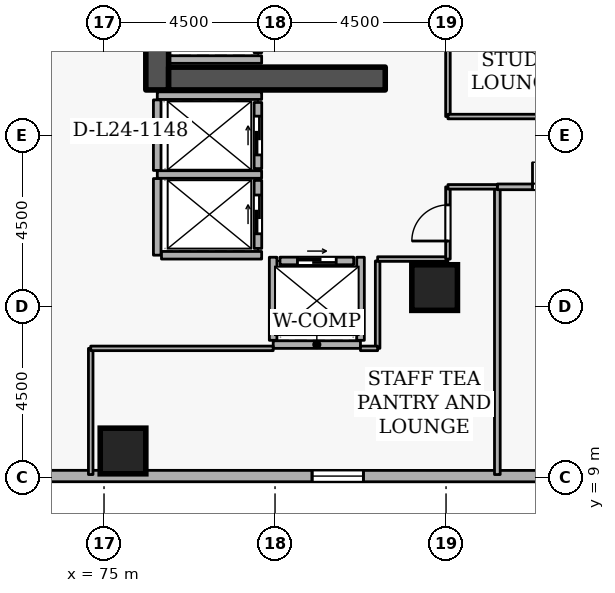
"""IFC4 building model, lengths in metres.
Left out: names, types, materials, properties, quantities, classifications, styles, units other than length and angle.
Written with IfcOpenShell. Run it as: python <this file> out.ifc"""

import sys

from ifc_helpers import new_model, si_unit, direction, frame, frame_2d, origin, origin_2d, place, context, subcontext, project, spatial, rectangle, extrude, element, fill, save


model = new_model("IFC4")
c1 = context("Model", 3, precision=1e-05, world=origin(), true_north=direction((0.0, 1.0)))
c2 = subcontext(c1, "Body", "Model", "MODEL_VIEW")
j1 = project(units=[si_unit("LENGTHUNIT", "METRE"), si_unit("PLANEANGLEUNIT", "RADIAN")], contexts=[c1])
p1 = place(None, origin())
s1 = spatial("IfcSite", under=j1, at=p1, CompositionType="ELEMENT")
p2 = place(p1, origin())
s2 = spatial("IfcBuilding", under=s1, at=p2, CompositionType="ELEMENT")
p3 = place(p2, frame((0.0, 0.0, 94.5)))
s3 = spatial("IfcBuildingStorey", under=s2, at=p3, CompositionType="ELEMENT", Elevation=94.5)
p4 = place(p3, frame((76.4, 19.2, 0.0), z_axis=(0.0, 0.0, 1.0), x_axis=(0.0, 1.0, 0.0)))
e1 = element("IfcWall", 1, at=p4, inside=s3, PredefinedType="SHEAR", context=c2, shape_type="SweptSolid", body=[
    extrude(rectangle(XDim=15.6, YDim=0.6, at=frame_2d((7.8, 0.0))), origin(), (0.0, 0.0, 1.0), 3.6),
])
p5 = place(p3, frame((76.7, 19.5, 0.0), z_axis=(0.0, 0.0, 1.0), x_axis=(1.0, 0.0, 0.0)))
e2 = element("IfcWall", 2, at=p5, inside=s3, PredefinedType="SHEAR", context=c2, shape_type="SweptSolid", body=[
    extrude(rectangle(XDim=5.7, YDim=0.6, at=frame_2d((2.85, 0.0))), origin(), (0.0, 0.0, 1.0), 3.6),
])
for number, where, z_axis, x_axis in (
    (3, (75.5, 9.7, 0.0), (0.0, 0.0, 1.0), (1.0, 0.0, 0.0)),
    (4, (83.7, 14.0, 0.0), (0.0, 0.0, 1.0), (1.0, 0.0, 0.0)),
):
    element("IfcColumn", number, at=place(p3, frame(where, z_axis=z_axis, x_axis=x_axis)), inside=s3, PredefinedType="COLUMN", context=c2, shape_type="SweptSolid", body=[
        extrude(rectangle(XDim=1.2, YDim=1.2, at=origin_2d()), origin(), (0.0, 0.0, 1.0), 3.6),
    ])
p6 = place(p3, frame((69.075, 9.042, 0.0), z_axis=(0.0, 0.0, 1.0), x_axis=(0.999999983371, -0.000182370391, 0.0)))
e5 = element("IfcWall", 5, at=p6, inside=s3, PredefinedType="STANDARD", context=c2, shape_type="SweptSolid", body=[
    extrude(rectangle(XDim=34.806, YDim=0.3, at=frame_2d((17.403, 0.0))), origin(), (0.0, 0.0, 1.0), 2.22),
])
p7 = place(p6, frame((1.8, 0.0, 0.72)))
e6 = element("IfcOpeningElement", 6, at=p7, cuts=e5, PredefinedType="OPENING", context=c2, shape_type="SweptSolid", body=[
    extrude(rectangle(XDim=1.35, YDim=1.05, at=frame_2d((0.675, 0.525))), frame((0.0, 0.16, 0.0), z_axis=(0.0, -1.0, 0.0), x_axis=(1.0, 0.0, 0.0)), (0.0, 0.0, 1.0), 0.32),
])
p8 = place(p6, frame((11.4, 0.0, 0.72)))
e7 = element("IfcOpeningElement", 7, at=p8, cuts=e5, PredefinedType="OPENING", context=c2, shape_type="SweptSolid", body=[
    extrude(rectangle(XDim=1.35, YDim=1.05, at=frame_2d((0.675, 0.525))), frame((0.0, 0.16, 0.0), z_axis=(0.0, -1.0, 0.0), x_axis=(1.0, 0.0, 0.0)), (0.0, 0.0, 1.0), 0.32),
])
p9 = place(p6, frame((21.0, 0.0, 0.72)))
e8 = element("IfcOpeningElement", 8, at=p9, cuts=e5, PredefinedType="OPENING", context=c2, shape_type="SweptSolid", body=[
    extrude(rectangle(XDim=1.35, YDim=1.05, at=frame_2d((0.675, 0.525))), frame((0.0, 0.16, 0.0), z_axis=(0.0, -1.0, 0.0), x_axis=(1.0, 0.0, 0.0)), (0.0, 0.0, 1.0), 0.32),
])
p10 = place(p6, frame((25.8, 0.0, 0.72)))
e9 = element("IfcOpeningElement", 9, at=p10, cuts=e5, PredefinedType="OPENING", context=c2, shape_type="SweptSolid", body=[
    extrude(rectangle(XDim=1.35, YDim=1.05, at=frame_2d((0.675, 0.525))), frame((0.0, 0.16, 0.0), z_axis=(0.0, -1.0, 0.0), x_axis=(1.0, 0.0, 0.0)), (0.0, 0.0, 1.0), 0.32),
])
p11 = place(p3, frame((79.05, 20.18, 0.0), z_axis=(0.0, 0.0, 1.0), x_axis=(0.0, 1.0, 0.0)))
e10 = element("IfcWall", 10, at=p11, inside=s3, PredefinedType="STANDARD", context=c2, shape_type="SweptSolid", body=[
    extrude(rectangle(XDim=1.94, YDim=0.2, at=frame_2d((0.97, 0.0))), origin(), (0.0, 0.0, 1.0), 3.3),
])
p12 = place(p3, frame((79.05, 17.13, 0.0), z_axis=(0.0, 0.0, 1.0), x_axis=(0.0, 1.0, 0.0)))
e11 = element("IfcWall", 11, at=p12, inside=s3, PredefinedType="STANDARD", context=c2, shape_type="SweptSolid", body=[
    extrude(rectangle(XDim=1.74, YDim=0.2, at=frame_2d((0.87, 0.0))), origin(), (0.0, 0.0, 1.0), 3.3),
])
p13 = place(p12, frame((0.36, 0.0, 0.0)))
e12 = element("IfcOpeningElement", 12, at=p13, cuts=e11, PredefinedType="OPENING", context=c2, shape_type="SweptSolid", body=[
    extrude(rectangle(XDim=1.02, YDim=2.06, at=frame_2d((0.51, 1.03))), frame((0.0, 0.11, 0.0), z_axis=(0.0, -1.0, 0.0), x_axis=(1.0, 0.0, 0.0)), (0.0, 0.0, 1.0), 0.22),
])
p14 = place(p3, frame((79.05, 15.03, 0.0), z_axis=(0.0, 0.0, 1.0), x_axis=(0.0, 1.0, 0.0)))
e13 = element("IfcWall", 13, at=p14, inside=s3, PredefinedType="STANDARD", context=c2, shape_type="SweptSolid", body=[
    extrude(rectangle(XDim=1.79, YDim=0.2, at=frame_2d((0.895, 0.0))), origin(), (0.0, 0.0, 1.0), 3.3),
])
p15 = place(p14, frame((0.385, 0.0, 0.0)))
e14 = element("IfcOpeningElement", 14, at=p15, cuts=e13, PredefinedType="OPENING", context=c2, shape_type="SweptSolid", body=[
    extrude(rectangle(XDim=1.02, YDim=2.06, at=frame_2d((0.51, 1.03))), frame((0.0, 0.11, 0.0), z_axis=(0.0, -1.0, 0.0), x_axis=(1.0, 0.0, 0.0)), (0.0, 0.0, 1.0), 0.22),
])
p16 = place(p3, frame((79.63, 14.7, 0.0), z_axis=(0.0, 0.0, 1.0), x_axis=(1.0, 0.0, 0.0)))
e15 = element("IfcWall", 15, at=p16, inside=s3, PredefinedType="STANDARD", context=c2, shape_type="SweptSolid", body=[
    extrude(rectangle(XDim=1.94, YDim=0.2, at=frame_2d((0.97, 0.0))), origin(), (0.0, 0.0, 1.0), 3.3),
])
p17 = place(p16, frame((0.46, 0.0, 0.0)))
e16 = element("IfcOpeningElement", 16, at=p17, cuts=e15, PredefinedType="OPENING", context=c2, shape_type="SweptSolid", body=[
    extrude(rectangle(XDim=1.02, YDim=2.06, at=frame_2d((0.51, 1.03))), frame((0.0, 0.11, 0.0), z_axis=(0.0, -1.0, 0.0), x_axis=(1.0, 0.0, 0.0)), (0.0, 0.0, 1.0), 0.22),
])
p18 = place(p3, frame((76.712, 20.0, 0.0), z_axis=(0.0, 0.0, 1.0), x_axis=(1.0, 0.0, 0.0)))
e17 = element("IfcWall", 17, at=p18, inside=s3, PredefinedType="STANDARD", context=c2, shape_type="SweptSolid", body=[
    extrude(rectangle(XDim=2.436, YDim=0.2, at=frame_2d((1.218, 0.0))), origin(), (0.0, 0.0, 1.0), 3.3),
])
p19 = place(p3, frame((76.402, 19.05, 0.0), z_axis=(0.0, 0.0, 1.0), x_axis=(1.0, 0.0, 0.0)))
e18 = element("IfcWall", 18, at=p19, inside=s3, PredefinedType="STANDARD", context=c2, shape_type="SweptSolid", body=[
    extrude(rectangle(XDim=2.746, YDim=0.2, at=frame_2d((1.373, 0.0))), origin(), (0.0, 0.0, 1.0), 2.505),
])
p20 = place(p3, frame((76.402, 16.975, 0.0), z_axis=(0.0, 0.0, 1.0), x_axis=(1.0, 0.0, 0.0)))
e19 = element("IfcWall", 19, at=p20, inside=s3, PredefinedType="STANDARD", context=c2, shape_type="SweptSolid", body=[
    extrude(rectangle(XDim=2.746, YDim=0.2, at=frame_2d((1.373, 0.0))), origin(), (0.0, 0.0, 1.0), 3.3),
])
p21 = place(p3, frame((76.4, 14.852, 0.0), z_axis=(0.0, 0.0, 1.0), x_axis=(0.0, 1.0, 0.0)))
e20 = element("IfcWall", 20, at=p21, inside=s3, PredefinedType="STANDARD", context=c2, shape_type="SweptSolid", body=[
    extrude(rectangle(XDim=2.016, YDim=0.2, at=frame_2d((1.008, 0.0))), origin(), (0.0, 0.0, 1.0), 3.3),
])
p22 = place(p3, frame((76.4, 17.082, 0.0), z_axis=(0.0, 0.0, 1.0), x_axis=(0.0, 1.0, 0.0)))
e21 = element("IfcWall", 21, at=p22, inside=s3, PredefinedType="STANDARD", context=c2, shape_type="SweptSolid", body=[
    extrude(rectangle(XDim=1.856, YDim=0.2, at=frame_2d((0.928, 0.0))), origin(), (0.0, 0.0, 1.0), 3.3),
])
p23 = place(p3, frame((76.512, 14.85, 0.0), z_axis=(0.0, 0.0, 1.0), x_axis=(1.0, 0.0, 0.0)))
e22 = element("IfcWall", 22, at=p23, inside=s3, PredefinedType="STANDARD", context=c2, shape_type="SweptSolid", body=[
    extrude(rectangle(XDim=2.636, YDim=0.2, at=frame_2d((1.318, 0.0))), origin(), (0.0, 0.0, 1.0), 3.3),
])
p24 = place(p3, frame((79.452, 12.5, 0.0), z_axis=(0.0, 0.0, 1.0), x_axis=(1.0, 0.0, 0.0)))
e23 = element("IfcWall", 23, at=p24, inside=s3, PredefinedType="STANDARD", context=c2, shape_type="SweptSolid", body=[
    extrude(rectangle(XDim=2.296, YDim=0.2, at=frame_2d((1.148, 0.0))), origin(), (0.0, 0.0, 1.0), 3.3),
])
for number, where, z_axis, x_axis in (
    (24, (81.75, 12.612, 0.0), (0.0, 0.0, 1.0), (0.0, 1.0, 0.0)),
    (25, (79.45, 12.612, 0.0), (0.0, 0.0, 1.0), (0.0, 1.0, 0.0)),
):
    element("IfcWall", number, at=place(p3, frame(where, z_axis=z_axis, x_axis=x_axis)), inside=s3, PredefinedType="STANDARD", context=c2, shape_type="SweptSolid", body=[
        extrude(rectangle(XDim=2.186, YDim=0.2, at=frame_2d((1.093, 0.0))), origin(), (0.0, 0.0, 1.0), 3.3),
    ])
p25 = place(p3, frame((85.35, 9.08, 0.0), z_axis=(0.0, 0.0, 1.0), x_axis=(0.0, 1.0, 0.0)))
e26 = element("IfcWall", 26, at=p25, inside=s3, PredefinedType="PARTITIONING", context=c2, shape_type="SweptSolid", body=[
    extrude(rectangle(XDim=7.57, YDim=0.15, at=frame_2d((3.785, 0.0))), origin(), (0.0, 0.0, 1.0), 3.3),
])
p26 = place(p3, frame((85.35, 16.65, 0.0), z_axis=(0.0, 0.0, 1.0), x_axis=(1.0, 0.0, 0.0)))
e27 = element("IfcWall", 27, at=p26, inside=s3, PredefinedType="PARTITIONING", context=c2, shape_type="SweptSolid", body=[
    extrude(rectangle(XDim=3.15, YDim=0.15, at=frame_2d((1.575, 0.0))), origin(), (0.0, 0.0, 1.0), 3.3),
])
p27 = place(p26, frame((0.925, 0.0, 0.0)))
e28 = element("IfcOpeningElement", 28, at=p27, cuts=e27, PredefinedType="OPENING", context=c2, shape_type="SweptSolid", body=[
    extrude(rectangle(XDim=1.3, YDim=2.12, at=frame_2d((0.65, 1.06))), frame((0.0, 0.085, 0.0), z_axis=(0.0, -1.0, 0.0), x_axis=(1.0, 0.0, 0.0)), (0.0, 0.0, 1.0), 0.17),
])
p28 = place(p3, frame((82.2, 12.4, 0.0), z_axis=(0.0, 0.0, 1.0), x_axis=(0.0, 1.0, 0.0)))
e29 = element("IfcWall", 29, at=p28, inside=s3, PredefinedType="PARTITIONING", context=c2, shape_type="SweptSolid", body=[
    extrude(rectangle(XDim=2.3, YDim=0.12, at=frame_2d((1.15, 0.0))), origin(), (0.0, 0.0, 1.0), 3.3),
])
p29 = place(p3, frame((82.2, 14.75, 0.0), z_axis=(0.0, 0.0, 1.0), x_axis=(1.0, 0.0, 0.0)))
e30 = element("IfcWall", 30, at=p29, inside=s3, PredefinedType="PARTITIONING", context=c2, shape_type="SweptSolid", body=[
    extrude(rectangle(XDim=1.85, YDim=0.12, at=frame_2d((0.925, 0.0))), origin(), (0.0, 0.0, 1.0), 3.3),
])
p30 = place(p3, frame((84.05, 14.75, 0.0), z_axis=(0.0, 0.0, 1.0), x_axis=(0.0, 1.0, 0.0)))
e31 = element("IfcWall", 31, at=p30, inside=s3, PredefinedType="PARTITIONING", context=c2, shape_type="SweptSolid", body=[
    extrude(rectangle(XDim=1.9, YDim=0.12, at=frame_2d((0.95, 0.0))), origin(), (0.0, 0.0, 1.0), 3.3),
])
p31 = place(p30, frame((0.475, 0.0, 0.0)))
e32 = element("IfcOpeningElement", 32, at=p31, cuts=e31, PredefinedType="OPENING", context=c2, shape_type="SweptSolid", body=[
    extrude(rectangle(XDim=0.95, YDim=2.1, at=frame_2d((0.475, 1.05))), frame((0.0, 0.07, 0.0), z_axis=(0.0, -1.0, 0.0), x_axis=(1.0, 0.0, 0.0)), (0.0, 0.0, 1.0), 0.14),
])
p32 = place(p3, frame((84.05, 16.65, 0.0), z_axis=(0.0, 0.0, 1.0), x_axis=(1.0, 0.0, 0.0)))
e33 = element("IfcWall", 33, at=p32, inside=s3, PredefinedType="PARTITIONING", context=c2, shape_type="SweptSolid", body=[
    extrude(rectangle(XDim=1.3, YDim=0.12, at=frame_2d((0.65, 0.0))), origin(), (0.0, 0.0, 1.0), 3.3),
])
p33 = place(p3, frame((74.65, 9.08, 0.0), z_axis=(0.0, 0.0, 1.0), x_axis=(0.0, 1.0, 0.0)))
e34 = element("IfcWall", 34, at=p33, inside=s3, PredefinedType="PARTITIONING", context=c2, shape_type="SweptSolid", body=[
    extrude(rectangle(XDim=3.32, YDim=0.12, at=frame_2d((1.66, 0.0))), origin(), (0.0, 0.0, 1.0), 3.3),
])
p34 = place(p3, frame((74.65, 12.4, 0.0), z_axis=(0.0, 0.0, 1.0), x_axis=(1.0, 0.0, 0.0)))
e35 = element("IfcWall", 35, at=p34, inside=s3, PredefinedType="PARTITIONING", context=c2, shape_type="SweptSolid", body=[
    extrude(rectangle(XDim=4.802, YDim=0.12, at=frame_2d((2.401, 0.0))), origin(), (0.0, 0.0, 1.0), 3.3),
])
p35 = place(p3, frame((81.748, 12.4, 0.0), z_axis=(0.0, 0.0, 1.0), x_axis=(1.0, 0.0, 0.0)))
e36 = element("IfcWall", 36, at=p35, inside=s3, PredefinedType="PARTITIONING", context=c2, shape_type="SweptSolid", body=[
    extrude(rectangle(XDim=0.452, YDim=0.12, at=frame_2d((0.226, 0.0))), origin(), (0.0, 0.0, 1.0), 3.3),
])
p36 = place(p3, frame((84.05, 18.5, 0.0), z_axis=(0.0, 0.0, 1.0), x_axis=(0.0, 1.0, 0.0)))
e37 = element("IfcWall", 37, at=p36, inside=s3, PredefinedType="PARTITIONING", context=c2, shape_type="SweptSolid", body=[
    extrude(rectangle(XDim=3.3, YDim=0.12, at=frame_2d((1.65, 0.0))), origin(), (0.0, 0.0, 1.0), 3.3),
])
p37 = place(p3, frame((92.95, 18.5, 0.0), z_axis=(0.0, 0.0, 1.0), x_axis=(-1.0, 0.0, 0.0)))
e38 = element("IfcWall", 38, at=p37, inside=s3, PredefinedType="PARTITIONING", context=c2, shape_type="SweptSolid", body=[
    extrude(rectangle(XDim=8.9, YDim=0.12, at=frame_2d((4.45, 0.0))), origin(), (0.0, 0.0, 1.0), 3.3),
])
p38 = place(p37, frame((2.875, 0.0, 0.0)))
e39 = element("IfcOpeningElement", 39, at=p38, cuts=e38, PredefinedType="OPENING", context=c2, shape_type="SweptSolid", body=[
    extrude(rectangle(XDim=0.95, YDim=2.1, at=frame_2d((0.475, 1.05))), frame((0.0, 0.07, 0.0), z_axis=(0.0, -1.0, 0.0), x_axis=(1.0, 0.0, 0.0)), (0.0, 0.0, 1.0), 0.14),
])
p39 = place(p8, origin())
e40 = element("IfcWindow", 40, at=p39, inside=s3, PartitioningType="SINGLE_PANEL", PredefinedType="WINDOW", context=c2, shape_type="SweptSolid", body=[
    extrude(rectangle(XDim=1.35, YDim=1.05, at=frame_2d((0.675, 0.525))), frame((0.0, 0.03, 0.0), z_axis=(0.0, -1.0, 0.0), x_axis=(1.0, 0.0, 0.0)), (0.0, 0.0, 1.0), 0.06),
])
fill(e7, e40)
p40 = place(p13, origin())
e41 = element("IfcDoor", 41, at=p40, inside=s3, OperationType="SLIDING_TO_LEFT", PredefinedType="DOOR", context=c2, shape_type="SweptSolid", body=[
    extrude(rectangle(XDim=1.02, YDim=2.06, at=frame_2d((0.51, 1.03))), frame((0.0, 0.025, 0.0), z_axis=(0.0, -1.0, 0.0), x_axis=(1.0, 0.0, 0.0)), (0.0, 0.0, 1.0), 0.05),
])
fill(e12, e41)
p41 = place(p15, origin())
e42 = element("IfcDoor", 42, at=p41, inside=s3, OperationType="SLIDING_TO_LEFT", PredefinedType="DOOR", context=c2, shape_type="SweptSolid", body=[
    extrude(rectangle(XDim=1.02, YDim=2.06, at=frame_2d((0.51, 1.03))), frame((0.0, 0.025, 0.0), z_axis=(0.0, -1.0, 0.0), x_axis=(1.0, 0.0, 0.0)), (0.0, 0.0, 1.0), 0.05),
])
fill(e14, e42)
p42 = place(p17, origin())
e43 = element("IfcDoor", 43, at=p42, inside=s3, OperationType="SLIDING_TO_LEFT", PredefinedType="DOOR", context=c2, shape_type="SweptSolid", body=[
    extrude(rectangle(XDim=1.02, YDim=2.06, at=frame_2d((0.51, 1.03))), frame((0.0, 0.025, 0.0), z_axis=(0.0, -1.0, 0.0), x_axis=(1.0, 0.0, 0.0)), (0.0, 0.0, 1.0), 0.05),
])
fill(e16, e43)
p43 = place(p27, origin())
e44 = element("IfcDoor", 44, at=p43, inside=s3, OperationType="DOUBLE_DOOR_SINGLE_SWING", PredefinedType="DOOR", context=c2, shape_type="SweptSolid", body=[
    extrude(rectangle(XDim=1.3, YDim=2.12, at=frame_2d((0.65, 1.06))), frame((0.0, 0.025, 0.0), z_axis=(0.0, -1.0, 0.0), x_axis=(1.0, 0.0, 0.0)), (0.0, 0.0, 1.0), 0.05),
])
fill(e28, e44)
p44 = place(p31, origin())
e45 = element("IfcDoor", 45, at=p44, inside=s3, OperationType="SINGLE_SWING_LEFT", PredefinedType="DOOR", context=c2, shape_type="SweptSolid", body=[
    extrude(rectangle(XDim=0.95, YDim=2.1, at=frame_2d((0.475, 1.05))), frame((0.0, 0.025, 0.0), z_axis=(0.0, -1.0, 0.0), x_axis=(1.0, 0.0, 0.0)), (0.0, 0.0, 1.0), 0.05),
])
fill(e32, e45)
save(model, sys.argv[1])
